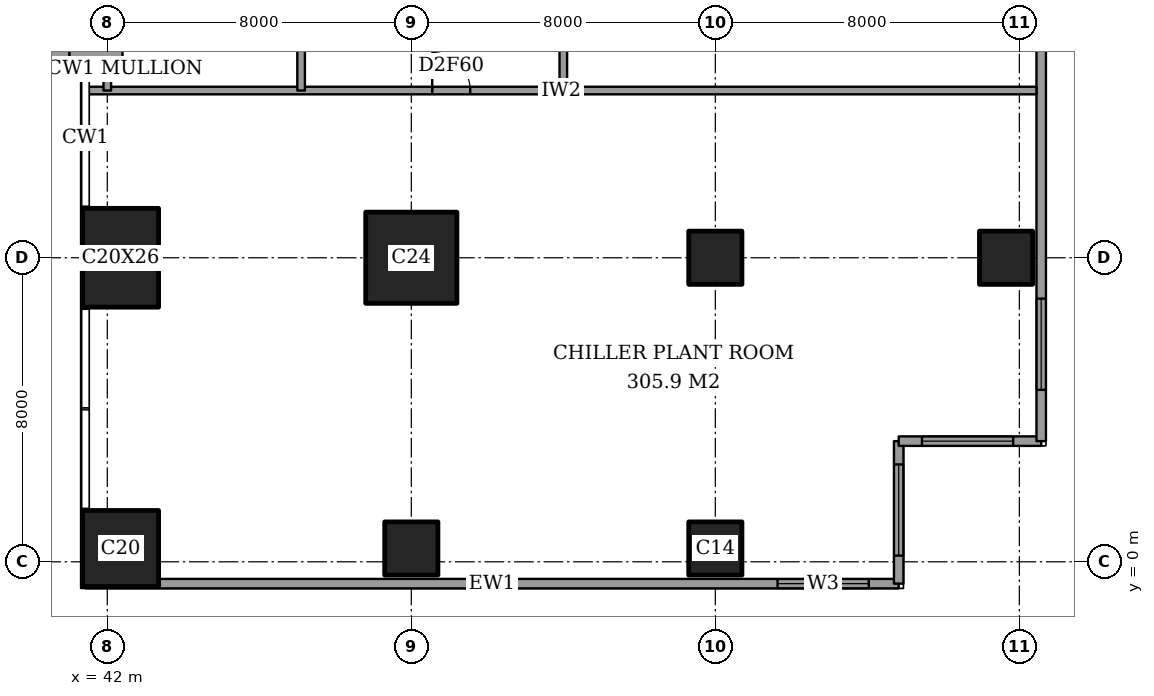
"""IFC4 building model, lengths in metres.
Left out: names, types, materials, properties, quantities, classifications, styles, units other than length and angle.
Written with IfcOpenShell. Run it as: python <this file> out.ifc"""

import sys

from ifc_helpers import new_model, si_unit, direction, frame, frame_2d, origin, origin_2d, place, context, subcontext, project, spatial, rectangle, extrude, element, fill, save


model = new_model("IFC4")
c1 = context("Model", 3, precision=1e-05, world=origin(), true_north=direction((0.0, 1.0)))
c2 = subcontext(c1, "Body", "Model", "MODEL_VIEW")
j1 = project(units=[si_unit("LENGTHUNIT", "METRE"), si_unit("PLANEANGLEUNIT", "RADIAN")], contexts=[c1])
p1 = place(None, origin())
s1 = spatial("IfcSite", under=j1, at=p1, CompositionType="ELEMENT")
p2 = place(p1, origin())
s2 = spatial("IfcBuilding", under=s1, at=p2, CompositionType="ELEMENT")
p3 = place(p2, frame((0.0, 0.0, 291.6)))
s3 = spatial("IfcBuildingStorey", under=s2, at=p3, CompositionType="ELEMENT", Elevation=291.6)
p4 = place(p3, frame((42.35, 0.35, 0.0), z_axis=(0.0, 0.0, 1.0), x_axis=(1.0, 0.0, 0.0)))
e1 = element("IfcColumn", 1, at=p4, inside=s3, PredefinedType="COLUMN", context=c2, shape_type="SweptSolid", body=[
    extrude(rectangle(XDim=2.0, YDim=2.0, at=origin_2d()), origin(), (0.0, 0.0, 1.0), 5.0),
])
p5 = place(p3, frame((42.35, 8.0, 0.0), z_axis=(0.0, 0.0, 1.0), x_axis=(1.0, 0.0, 0.0)))
e2 = element("IfcColumn", 2, at=p5, inside=s3, PredefinedType="COLUMN", context=c2, shape_type="SweptSolid", body=[
    extrude(rectangle(XDim=2.0, YDim=2.6, at=origin_2d()), origin(), (0.0, 0.0, 1.0), 5.0),
])
p6 = place(p3, frame((50.0, 0.35, 0.0), z_axis=(0.0, 0.0, 1.0), x_axis=(1.0, 0.0, 0.0)))
e3 = element("IfcColumn", 3, at=p6, inside=s3, PredefinedType="COLUMN", context=c2, shape_type="SweptSolid", body=[
    extrude(rectangle(XDim=1.4, YDim=1.4, at=origin_2d()), origin(), (0.0, 0.0, 1.0), 5.0),
])
p7 = place(p3, frame((50.0, 8.0, 0.0), z_axis=(0.0, 0.0, 1.0), x_axis=(1.0, 0.0, 0.0)))
e4 = element("IfcColumn", 4, at=p7, inside=s3, PredefinedType="COLUMN", context=c2, shape_type="SweptSolid", body=[
    extrude(rectangle(XDim=2.4, YDim=2.4, at=origin_2d()), origin(), (0.0, 0.0, 1.0), 5.0),
])
for number, where, z_axis, x_axis in (
    (5, (58.0, 0.35, 0.0), (0.0, 0.0, 1.0), (1.0, 0.0, 0.0)),
    (6, (58.0, 8.0, 0.0), (0.0, 0.0, 1.0), (1.0, 0.0, 0.0)),
    (7, (65.65, 8.0, 0.0), (0.0, 0.0, 1.0), (1.0, 0.0, 0.0)),
):
    element("IfcColumn", number, at=place(p3, frame(where, z_axis=z_axis, x_axis=x_axis)), inside=s3, PredefinedType="COLUMN", context=c2, shape_type="SweptSolid", body=[
        extrude(rectangle(XDim=1.4, YDim=1.4, at=origin_2d()), origin(), (0.0, 0.0, 1.0), 5.0),
    ])
p8 = place(p3, frame((37.85, 14.0, 0.0), z_axis=(0.0, 0.0, 1.0), x_axis=(1.0, 0.0, 0.0)))
e8 = element("IfcWall", 8, at=p8, inside=s3, PredefinedType="SHEAR", context=c2, shape_type="SweptSolid", body=[
    extrude(rectangle(XDim=3.15, YDim=2.0, at=frame_2d((1.575, 0.0))), origin(), (0.0, 0.0, 1.0), 5.0),
])
p9 = place(p3, frame((41.7, 13.0, 0.0), z_axis=(0.0, 0.0, 1.0), x_axis=(0.0, 1.0, 0.0)))
e9 = element("IfcWall", 9, at=p9, inside=s3, PredefinedType="SHEAR", context=c2, shape_type="SweptSolid", body=[
    extrude(rectangle(XDim=11.85, YDim=1.4, at=frame_2d((5.925, 0.0))), origin(), (0.0, 0.0, 1.0), 5.0),
])
p10 = place(p9, frame((7.5, 0.0, 0.0)))
e10 = element("IfcOpeningElement", 10, at=p10, cuts=e9, PredefinedType="OPENING", context=c2, shape_type="SweptSolid", body=[
    extrude(rectangle(XDim=1.8, YDim=2.4, at=frame_2d((0.9, 1.2))), frame((0.0, 0.71, 0.0), z_axis=(0.0, -1.0, 0.0), x_axis=(1.0, 0.0, 0.0)), (0.0, 0.0, 1.0), 1.42),
])
p11 = place(p3, frame((41.425, -0.575, 0.0), z_axis=(0.0, 0.0, 1.0), x_axis=(1.0, 0.0, 0.0)))
e11 = element("IfcWall", 11, at=p11, inside=s3, PredefinedType="SOLIDWALL", context=c2, shape_type="SweptSolid", body=[
    extrude(rectangle(XDim=21.4, YDim=0.25, at=frame_2d((10.7, 0.0))), origin(), (0.0, 0.0, 1.0), 5.0),
])
p12 = place(p11, frame((18.212, 0.0, 0.6)))
e12 = element("IfcOpeningElement", 12, at=p12, cuts=e11, PredefinedType="OPENING", context=c2, shape_type="SweptSolid", body=[
    extrude(rectangle(XDim=2.4, YDim=3.0, at=frame_2d((1.2, 1.5))), frame((0.0, 0.135, 0.0), z_axis=(0.0, -1.0, 0.0), x_axis=(1.0, 0.0, 0.0)), (0.0, 0.0, 1.0), 0.27),
])
p13 = place(p3, frame((62.825, -0.575, 0.0), z_axis=(0.0, 0.0, 1.0), x_axis=(0.0, 1.0, 0.0)))
e13 = element("IfcWall", 13, at=p13, inside=s3, PredefinedType="SOLIDWALL", context=c2, shape_type="SweptSolid", body=[
    extrude(rectangle(XDim=3.75, YDim=0.25, at=frame_2d((1.875, 0.0))), origin(), (0.0, 0.0, 1.0), 5.0),
])
p14 = place(p13, frame((0.738, 0.0, 0.6)))
e14 = element("IfcOpeningElement", 14, at=p14, cuts=e13, PredefinedType="OPENING", context=c2, shape_type="SweptSolid", body=[
    extrude(rectangle(XDim=2.4, YDim=3.0, at=frame_2d((1.2, 1.5))), frame((0.0, 0.135, 0.0), z_axis=(0.0, -1.0, 0.0), x_axis=(1.0, 0.0, 0.0)), (0.0, 0.0, 1.0), 0.27),
])
p15 = place(p3, frame((62.825, 3.175, 0.0), z_axis=(0.0, 0.0, 1.0), x_axis=(1.0, 0.0, 0.0)))
e15 = element("IfcWall", 15, at=p15, inside=s3, PredefinedType="SOLIDWALL", context=c2, shape_type="SweptSolid", body=[
    extrude(rectangle(XDim=3.75, YDim=0.25, at=frame_2d((1.875, 0.0))), origin(), (0.0, 0.0, 1.0), 5.0),
])
p16 = place(p15, frame((0.613, 0.0, 0.6)))
e16 = element("IfcOpeningElement", 16, at=p16, cuts=e15, PredefinedType="OPENING", context=c2, shape_type="SweptSolid", body=[
    extrude(rectangle(XDim=2.4, YDim=3.0, at=frame_2d((1.2, 1.5))), frame((0.0, 0.135, 0.0), z_axis=(0.0, -1.0, 0.0), x_axis=(1.0, 0.0, 0.0)), (0.0, 0.0, 1.0), 0.27),
])
p17 = place(p3, frame((66.575, 3.175, 0.0), z_axis=(0.0, 0.0, 1.0), x_axis=(0.0, 1.0, 0.0)))
e17 = element("IfcWall", 17, at=p17, inside=s3, PredefinedType="SOLIDWALL", context=c2, shape_type="SweptSolid", body=[
    extrude(rectangle(XDim=41.65, YDim=0.25, at=frame_2d((20.825, 0.0))), origin(), (0.0, 0.0, 1.0), 5.0),
])
p18 = place(p17, frame((1.35, 0.0, 0.6)))
e18 = element("IfcOpeningElement", 18, at=p18, cuts=e17, PredefinedType="OPENING", context=c2, shape_type="SweptSolid", body=[
    extrude(rectangle(XDim=2.4, YDim=3.0, at=frame_2d((1.2, 1.5))), frame((0.0, 0.135, 0.0), z_axis=(0.0, -1.0, 0.0), x_axis=(1.0, 0.0, 0.0)), (0.0, 0.0, 1.0), 0.27),
])
p19 = place(p17, frame((19.625, 0.0, 0.6)))
e19 = element("IfcOpeningElement", 19, at=p19, cuts=e17, PredefinedType="OPENING", context=c2, shape_type="SweptSolid", body=[
    extrude(rectangle(XDim=2.4, YDim=3.0, at=frame_2d((1.2, 1.5))), frame((0.0, 0.135, 0.0), z_axis=(0.0, -1.0, 0.0), x_axis=(1.0, 0.0, 0.0)), (0.0, 0.0, 1.0), 0.27),
])
p20 = place(p17, frame((37.9, 0.0, 0.6)))
e20 = element("IfcOpeningElement", 20, at=p20, cuts=e17, PredefinedType="OPENING", context=c2, shape_type="SweptSolid", body=[
    extrude(rectangle(XDim=2.4, YDim=3.0, at=frame_2d((1.2, 1.5))), frame((0.0, 0.135, 0.0), z_axis=(0.0, -1.0, 0.0), x_axis=(1.0, 0.0, 0.0)), (0.0, 0.0, 1.0), 0.27),
])
p21 = place(p3, frame((41.439, 12.4, 0.0), z_axis=(0.0, 0.0, 1.0), x_axis=(1.0, 0.0, 0.0)))
e21 = element("IfcWall", 21, at=p21, inside=s3, PredefinedType="PARTITIONING", context=c2, shape_type="SweptSolid", body=[
    extrude(rectangle(XDim=25.011, YDim=0.2, at=frame_2d((12.505, 0.0))), origin(), (0.0, 0.0, 1.0), 4.7),
])
p22 = place(p21, frame((9.111, 0.0, 0.0)))
e22 = element("IfcOpeningElement", 22, at=p22, cuts=e21, PredefinedType="OPENING", context=c2, shape_type="SweptSolid", body=[
    extrude(rectangle(XDim=1.0, YDim=2.1, at=frame_2d((0.5, 1.05))), frame((0.0, 0.11, 0.0), z_axis=(0.0, -1.0, 0.0), x_axis=(1.0, 0.0, 0.0)), (0.0, 0.0, 1.0), 0.22),
])
p23 = place(p3, frame((42.0, 12.4, 0.0), z_axis=(0.0, 0.0, 1.0), x_axis=(0.0, 1.0, 0.0)))
e23 = element("IfcWall", 23, at=p23, inside=s3, PredefinedType="PARTITIONING", context=c2, shape_type="SweptSolid", body=[
    extrude(rectangle(XDim=0.6, YDim=0.2, at=frame_2d((0.3, 0.0))), origin(), (0.0, 0.0, 1.0), 4.7),
])
p24 = place(p3, frame((47.1, 12.4, 0.0), z_axis=(0.0, 0.0, 1.0), x_axis=(0.0, 1.0, 0.0)))
e24 = element("IfcWall", 24, at=p24, inside=s3, PredefinedType="PARTITIONING", context=c2, shape_type="SweptSolid", body=[
    extrude(rectangle(XDim=7.6, YDim=0.2, at=frame_2d((3.8, 0.0))), origin(), (0.0, 0.0, 1.0), 4.7),
])
p25 = place(p24, frame((1.95, 0.0, 0.0)))
e25 = element("IfcOpeningElement", 25, at=p25, cuts=e24, PredefinedType="OPENING", context=c2, shape_type="SweptSolid", body=[
    extrude(rectangle(XDim=1.0, YDim=2.1, at=frame_2d((0.5, 1.05))), frame((0.0, 0.11, 0.0), z_axis=(0.0, -1.0, 0.0), x_axis=(1.0, 0.0, 0.0)), (0.0, 0.0, 1.0), 0.22),
])
p26 = place(p24, frame((5.85, 0.0, 0.0)))
e26 = element("IfcOpeningElement", 26, at=p26, cuts=e24, PredefinedType="OPENING", context=c2, shape_type="SweptSolid", body=[
    extrude(rectangle(XDim=1.0, YDim=2.1, at=frame_2d((0.5, 1.05))), frame((0.0, 0.11, 0.0), z_axis=(0.0, -1.0, 0.0), x_axis=(1.0, 0.0, 0.0)), (0.0, 0.0, 1.0), 0.22),
])
p27 = place(p3, frame((54.0, 12.4, 0.0), z_axis=(0.0, 0.0, 1.0), x_axis=(0.0, 1.0, 0.0)))
e27 = element("IfcWall", 27, at=p27, inside=s3, PredefinedType="PARTITIONING", context=c2, shape_type="SweptSolid", body=[
    extrude(rectangle(XDim=23.2, YDim=0.2, at=frame_2d((11.6, 0.0))), origin(), (0.0, 0.0, 1.0), 4.7),
])
p28 = place(p27, frame((11.1, 0.0, 0.0)))
e28 = element("IfcOpeningElement", 28, at=p28, cuts=e27, PredefinedType="OPENING", context=c2, shape_type="SweptSolid", body=[
    extrude(rectangle(XDim=1.0, YDim=2.1, at=frame_2d((0.5, 1.05))), frame((0.0, 0.11, 0.0), z_axis=(0.0, -1.0, 0.0), x_axis=(1.0, 0.0, 0.0)), (0.0, 0.0, 1.0), 0.22),
])
p29 = place(p12, origin())
e29 = element("IfcWindow", 29, at=p29, inside=s3, PartitioningType="SINGLE_PANEL", PredefinedType="WINDOW", context=c2, shape_type="SweptSolid", body=[
    extrude(rectangle(XDim=2.4, YDim=3.0, at=frame_2d((1.2, 1.5))), frame((0.0, 0.03, 0.0), z_axis=(0.0, -1.0, 0.0), x_axis=(1.0, 0.0, 0.0)), (0.0, 0.0, 1.0), 0.06),
])
fill(e12, e29)
p30 = place(p14, origin())
e30 = element("IfcWindow", 30, at=p30, inside=s3, PartitioningType="SINGLE_PANEL", PredefinedType="WINDOW", context=c2, shape_type="SweptSolid", body=[
    extrude(rectangle(XDim=2.4, YDim=3.0, at=frame_2d((1.2, 1.5))), frame((0.0, 0.03, 0.0), z_axis=(0.0, -1.0, 0.0), x_axis=(1.0, 0.0, 0.0)), (0.0, 0.0, 1.0), 0.06),
])
fill(e14, e30)
p31 = place(p16, origin())
e31 = element("IfcWindow", 31, at=p31, inside=s3, PartitioningType="SINGLE_PANEL", PredefinedType="WINDOW", context=c2, shape_type="SweptSolid", body=[
    extrude(rectangle(XDim=2.4, YDim=3.0, at=frame_2d((1.2, 1.5))), frame((0.0, 0.03, 0.0), z_axis=(0.0, -1.0, 0.0), x_axis=(1.0, 0.0, 0.0)), (0.0, 0.0, 1.0), 0.06),
])
fill(e16, e31)
p32 = place(p18, origin())
e32 = element("IfcWindow", 32, at=p32, inside=s3, PartitioningType="SINGLE_PANEL", PredefinedType="WINDOW", context=c2, shape_type="SweptSolid", body=[
    extrude(rectangle(XDim=2.4, YDim=3.0, at=frame_2d((1.2, 1.5))), frame((0.0, 0.03, 0.0), z_axis=(0.0, -1.0, 0.0), x_axis=(1.0, 0.0, 0.0)), (0.0, 0.0, 1.0), 0.06),
])
fill(e18, e32)
p33 = place(p22, origin())
e33 = element("IfcDoor", 33, at=p33, inside=s3, OperationType="SINGLE_SWING_RIGHT", PredefinedType="DOOR", context=c2, shape_type="SweptSolid", body=[
    extrude(rectangle(XDim=1.0, YDim=2.1, at=frame_2d((0.5, 1.05))), frame((0.0, 0.025, 0.0), z_axis=(0.0, -1.0, 0.0), x_axis=(1.0, 0.0, 0.0)), (0.0, 0.0, 1.0), 0.05),
])
fill(e22, e33)
save(model, sys.argv[1])
